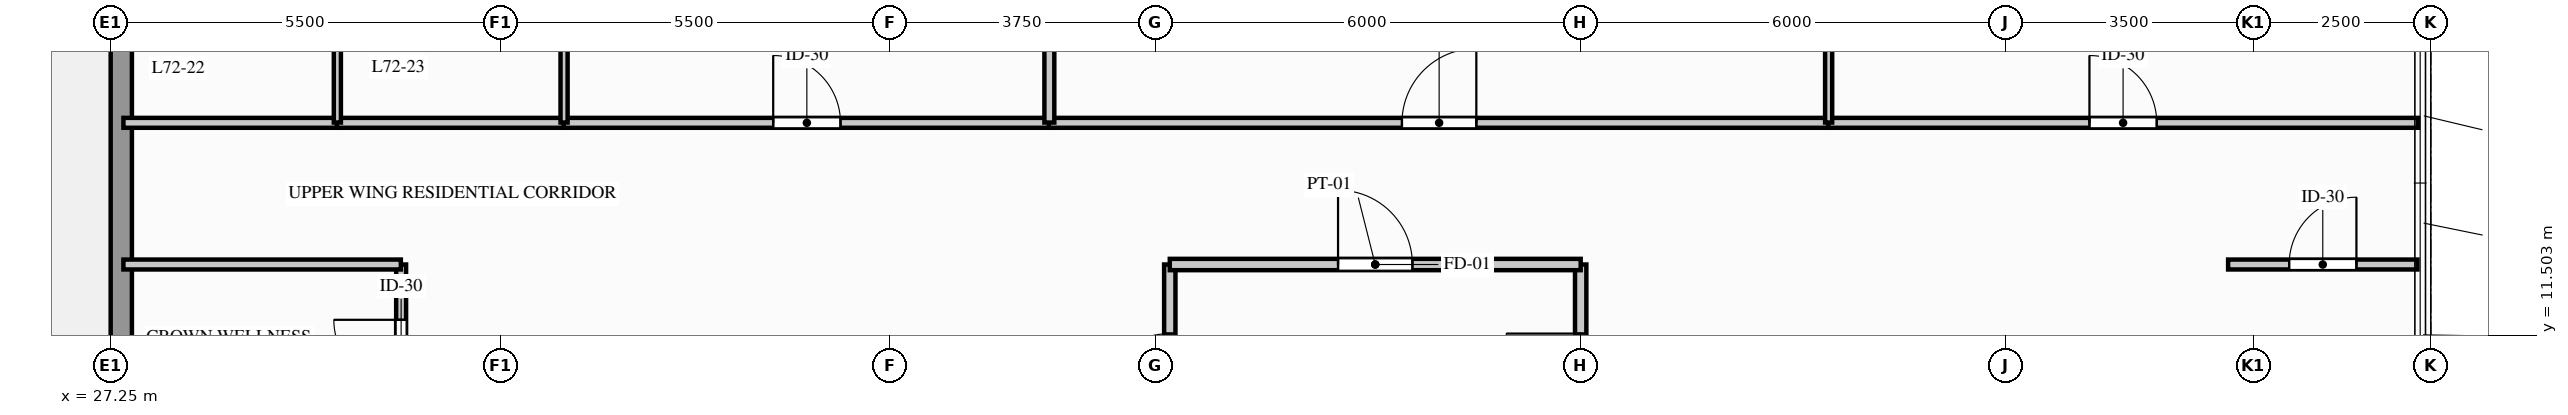
"""IFC4 building model, lengths in metres.
Left out: names, types, materials, properties, quantities, classifications, styles, units other than length and angle.
Written with IfcOpenShell. Run it as: python <this file> out.ifc"""

import sys

from ifc_helpers import new_model, si_unit, direction, frame, frame_2d, origin, place, context, subcontext, project, spatial, rectangle, extrude, element, fill, save


model = new_model("IFC4")
c1 = context("Model", 3, precision=1e-05, world=origin(), true_north=direction((0.0, 1.0)))
c2 = subcontext(c1, "Body", "Model", "MODEL_VIEW")
j1 = project(units=[si_unit("LENGTHUNIT", "METRE"), si_unit("PLANEANGLEUNIT", "RADIAN")], contexts=[c1])
p1 = place(None, origin())
s1 = spatial("IfcSite", under=j1, at=p1, CompositionType="ELEMENT")
p2 = place(p1, origin())
s2 = spatial("IfcBuilding", under=s1, at=p2, CompositionType="ELEMENT")
p3 = place(p2, frame((0.0, 0.0, 236.6)))
s3 = spatial("IfcBuildingStorey", under=s2, at=p3, CompositionType="ELEMENT", Elevation=236.6)
p4 = place(p3, frame((27.4, 24.0, 0.0), z_axis=(0.0, 0.0, 1.0), x_axis=(0.0, -1.0, 0.0)))
e1 = element("IfcWall", 1, at=p4, inside=s3, PredefinedType="STANDARD", context=c2, shape_type="SweptSolid", body=[
    extrude(rectangle(XDim=21.5, YDim=0.3, at=frame_2d((10.75, 0.0))), origin(), (0.0, 0.0, 1.0), 2.635),
])
p5 = place(p4, frame((5.5, 0.0, 0.0)))
e2 = element("IfcOpeningElement", 2, at=p5, cuts=e1, PredefinedType="OPENING", context=c2, shape_type="SweptSolid", body=[
    extrude(rectangle(XDim=1.1, YDim=2.2, at=frame_2d((0.55, 1.1))), frame((0.0, 0.16, 0.0), z_axis=(0.0, -1.0, 0.0), x_axis=(1.0, 0.0, 0.0)), (0.0, 0.0, 1.0), 0.32),
])
p6 = place(p4, frame((2.43, 0.0, 0.616)))
e3 = element("IfcOpeningElement", 3, at=p6, cuts=e1, PredefinedType="OPENING", context=c2, shape_type="SweptSolid", body=[
    extrude(rectangle(XDim=1.5, YDim=1.8, at=frame_2d((0.75, 0.9))), frame((0.0, 0.16, 0.0), z_axis=(0.0, -1.0, 0.0), x_axis=(1.0, 0.0, 0.0)), (0.0, 0.0, 1.0), 0.32),
])
p7 = place(p3, frame((31.35, 9.989, 0.0), z_axis=(0.0, 0.0, 1.0), x_axis=(0.0, 1.0, 0.0)))
e4 = element("IfcWall", 4, at=p7, inside=s3, PredefinedType="PARTITIONING", context=c2, shape_type="SweptSolid", body=[
    extrude(rectangle(XDim=2.511, YDim=0.14, at=frame_2d((1.256, 0.0))), origin(), (0.0, 0.0, 1.0), 2.139),
])
p8 = place(p7, frame((0.781, 0.0, 0.0)))
e5 = element("IfcOpeningElement", 5, at=p8, cuts=e4, PredefinedType="OPENING", context=c2, shape_type="SweptSolid", body=[
    extrude(rectangle(XDim=0.95, YDim=2.05, at=frame_2d((0.475, 1.025))), frame((0.0, 0.08, 0.0), z_axis=(0.0, -1.0, 0.0), x_axis=(1.0, 0.0, 0.0)), (0.0, 0.0, 1.0), 0.16),
])
p9 = place(p3, frame((42.2, 9.5, 0.0), z_axis=(0.0, 0.0, 1.0), x_axis=(0.0, 1.0, 0.0)))
e6 = element("IfcWall", 6, at=p9, inside=s3, PredefinedType="PARTITIONING", context=c2, shape_type="SweptSolid", body=[
    extrude(rectangle(XDim=3.0, YDim=0.16, at=frame_2d((1.5, 0.0))), origin(), (0.0, 0.0, 1.0), 2.139),
])
p10 = place(p9, frame((0.975, 0.0, 0.0)))
e7 = element("IfcOpeningElement", 7, at=p10, cuts=e6, PredefinedType="OPENING", context=c2, shape_type="SweptSolid", body=[
    extrude(rectangle(XDim=1.05, YDim=2.06, at=frame_2d((0.525, 1.03))), frame((0.0, 0.09, 0.0), z_axis=(0.0, -1.0, 0.0), x_axis=(1.0, 0.0, 0.0)), (0.0, 0.0, 1.0), 0.18),
])
p11 = place(p3, frame((48.0, 9.5, 0.0), z_axis=(0.0, 0.0, 1.0), x_axis=(0.0, 1.0, 0.0)))
e8 = element("IfcWall", 8, at=p11, inside=s3, PredefinedType="PARTITIONING", context=c2, shape_type="SweptSolid", body=[
    extrude(rectangle(XDim=3.0, YDim=0.16, at=frame_2d((1.5, 0.0))), origin(), (0.0, 0.0, 1.0), 2.563),
])
p12 = place(p11, frame((0.975, 0.0, 0.0)))
e9 = element("IfcOpeningElement", 9, at=p12, cuts=e8, PredefinedType="OPENING", context=c2, shape_type="SweptSolid", body=[
    extrude(rectangle(XDim=1.05, YDim=2.06, at=frame_2d((0.525, 1.03))), frame((0.0, 0.09, 0.0), z_axis=(0.0, -1.0, 0.0), x_axis=(1.0, 0.0, 0.0)), (0.0, 0.0, 1.0), 0.18),
])
p13 = place(p3, frame((42.2, 12.5, 0.0), z_axis=(0.0, 0.0, 1.0), x_axis=(1.0, 0.0, 0.0)))
e10 = element("IfcWall", 10, at=p13, inside=s3, PredefinedType="PARTITIONING", context=c2, shape_type="SweptSolid", body=[
    extrude(rectangle(XDim=5.8, YDim=0.16, at=frame_2d((2.9, 0.0))), origin(), (0.0, 0.0, 1.0), 2.563),
])
p14 = place(p13, frame((2.375, 0.0, 0.0)))
e11 = element("IfcOpeningElement", 11, at=p14, cuts=e10, PredefinedType="OPENING", context=c2, shape_type="SweptSolid", body=[
    extrude(rectangle(XDim=1.05, YDim=2.06, at=frame_2d((0.525, 1.03))), frame((0.0, 0.09, 0.0), z_axis=(0.0, -1.0, 0.0), x_axis=(1.0, 0.0, 0.0)), (0.0, 0.0, 1.0), 0.18),
])
p15 = place(p3, frame((57.139, 12.5, 0.0), z_axis=(0.0, 0.0, 1.0), x_axis=(1.0, 0.0, 0.0)))
e12 = element("IfcWall", 12, at=p15, inside=s3, PredefinedType="PARTITIONING", context=c2, shape_type="SweptSolid", body=[
    extrude(rectangle(XDim=2.673, YDim=0.14, at=frame_2d((1.336, 0.0))), origin(), (0.0, 0.0, 1.0), 3.2),
])
p16 = place(p15, frame((0.861, 0.0, 0.0)))
e13 = element("IfcOpeningElement", 13, at=p16, cuts=e12, PredefinedType="OPENING", context=c2, shape_type="SweptSolid", body=[
    extrude(rectangle(XDim=0.95, YDim=2.05, at=frame_2d((0.475, 1.025))), frame((0.0, 0.08, 0.0), z_axis=(0.0, -1.0, 0.0), x_axis=(1.0, 0.0, 0.0)), (0.0, 0.0, 1.0), 0.16),
])
p17 = place(p3, frame((27.43, 12.5, 0.0), z_axis=(0.0, 0.0, 1.0), x_axis=(1.0, 0.0, 0.0)))
e14 = element("IfcWall", 14, at=p17, inside=s3, PredefinedType="PARTITIONING", context=c2, shape_type="SweptSolid", body=[
    extrude(rectangle(XDim=3.916, YDim=0.14, at=frame_2d((1.958, 0.0))), origin(), (0.0, 0.0, 1.0), 3.2),
])
p18 = place(p3, frame((27.43, 14.5, 0.0), z_axis=(0.0, 0.0, 1.0), x_axis=(1.0, 0.0, 0.0)))
e15 = element("IfcWall", 15, at=p18, inside=s3, PredefinedType="PARTITIONING", context=c2, shape_type="SweptSolid", body=[
    extrude(rectangle(XDim=3.031, YDim=0.14, at=frame_2d((1.516, 0.0))), origin(), (0.0, 0.0, 1.0), 3.2),
])
p19 = place(p3, frame((30.443, 14.5, 0.0), z_axis=(0.0, 0.0, 1.0), x_axis=(1.0, 0.0, 0.0)))
e16 = element("IfcWall", 16, at=p19, inside=s3, PredefinedType="PARTITIONING", context=c2, shape_type="SweptSolid", body=[
    extrude(rectangle(XDim=3.219, YDim=0.14, at=frame_2d((1.609, 0.0))), origin(), (0.0, 0.0, 1.0), 3.2),
])
p20 = place(p3, frame((33.643, 14.5, 0.0), z_axis=(0.0, 0.0, 1.0), x_axis=(1.0, 0.0, 0.0)))
e17 = element("IfcWall", 17, at=p20, inside=s3, PredefinedType="PARTITIONING", context=c2, shape_type="SweptSolid", body=[
    extrude(rectangle(XDim=6.869, YDim=0.14, at=frame_2d((3.434, 0.0))), origin(), (0.0, 0.0, 1.0), 2.563),
])
p21 = place(p20, frame((2.959, 0.0, 0.0)))
e18 = element("IfcOpeningElement", 18, at=p21, cuts=e17, PredefinedType="OPENING", context=c2, shape_type="SweptSolid", body=[
    extrude(rectangle(XDim=0.95, YDim=2.05, at=frame_2d((0.475, 1.025))), frame((0.0, 0.08, 0.0), z_axis=(0.0, -1.0, 0.0), x_axis=(1.0, 0.0, 0.0)), (0.0, 0.0, 1.0), 0.16),
])
p22 = place(p3, frame((40.493, 14.5, 0.0), z_axis=(0.0, 0.0, 1.0), x_axis=(1.0, 0.0, 0.0)))
e19 = element("IfcWall", 19, at=p22, inside=s3, PredefinedType="PARTITIONING", context=c2, shape_type="SweptSolid", body=[
    extrude(rectangle(XDim=11.019, YDim=0.14, at=frame_2d((5.509, 0.0))), origin(), (0.0, 0.0, 1.0), 2.563),
])
p23 = place(p22, frame((4.984, 0.0, 0.0)))
e20 = element("IfcOpeningElement", 20, at=p23, cuts=e19, PredefinedType="OPENING", context=c2, shape_type="SweptSolid", body=[
    extrude(rectangle(XDim=1.05, YDim=2.06, at=frame_2d((0.525, 1.03))), frame((0.0, 0.08, 0.0), z_axis=(0.0, -1.0, 0.0), x_axis=(1.0, 0.0, 0.0)), (0.0, 0.0, 1.0), 0.16),
])
p24 = place(p3, frame((51.493, 14.5, 0.0), z_axis=(0.0, 0.0, 1.0), x_axis=(1.0, 0.0, 0.0)))
e21 = element("IfcWall", 21, at=p24, inside=s3, PredefinedType="PARTITIONING", context=c2, shape_type="SweptSolid", body=[
    extrude(rectangle(XDim=8.327, YDim=0.14, at=frame_2d((4.164, 0.0))), origin(), (0.0, 0.0, 1.0), 2.563),
])
p25 = place(p24, frame((3.689, 0.0, 0.0)))
e22 = element("IfcOpeningElement", 22, at=p25, cuts=e21, PredefinedType="OPENING", context=c2, shape_type="SweptSolid", body=[
    extrude(rectangle(XDim=0.95, YDim=2.05, at=frame_2d((0.475, 1.025))), frame((0.0, 0.08, 0.0), z_axis=(0.0, -1.0, 0.0), x_axis=(1.0, 0.0, 0.0)), (0.0, 0.0, 1.0), 0.16),
])
for number, where, z_axis, x_axis in (
    (23, (30.45, 14.504, 0.0), (0.0, 0.0, 1.0), (0.0, 1.0, 0.0)),
    (24, (33.65, 14.504, 0.0), (0.0, 0.0, 1.0), (0.0, 1.0, 0.0)),
):
    element("IfcWall", number, at=place(p3, frame(where, z_axis=z_axis, x_axis=x_axis)), inside=s3, PredefinedType="PARTITIONING", context=c2, shape_type="SweptSolid", body=[
        extrude(rectangle(XDim=2.346, YDim=0.1, at=frame_2d((1.173, 0.0))), origin(), (0.0, 0.0, 1.0), 2.139),
    ])
p26 = place(p3, frame((40.5, 14.504, 0.0), z_axis=(0.0, 0.0, 1.0), x_axis=(0.0, 1.0, 0.0)))
e25 = element("IfcWall", 25, at=p26, inside=s3, PredefinedType="PARTITIONING", context=c2, shape_type="SweptSolid", body=[
    extrude(rectangle(XDim=2.342, YDim=0.14, at=frame_2d((1.171, 0.0))), origin(), (0.0, 0.0, 1.0), 2.139),
])
p27 = place(p3, frame((51.5, 14.504, 0.0), z_axis=(0.0, 0.0, 1.0), x_axis=(0.0, 1.0, 0.0)))
e26 = element("IfcWall", 26, at=p27, inside=s3, PredefinedType="PARTITIONING", context=c2, shape_type="SweptSolid", body=[
    extrude(rectangle(XDim=11.816, YDim=0.1, at=frame_2d((5.908, 0.0))), origin(), (0.0, 0.0, 1.0), 2.563),
])
p28 = place(p8, origin())
e27 = element("IfcDoor", 27, at=p28, inside=s3, OperationType="SINGLE_SWING_RIGHT", PredefinedType="DOOR", context=c2, shape_type="SweptSolid", body=[
    extrude(rectangle(XDim=0.95, YDim=2.05, at=frame_2d((0.475, 1.025))), frame((0.0, 0.025, 0.0), z_axis=(0.0, -1.0, 0.0), x_axis=(1.0, 0.0, 0.0)), (0.0, 0.0, 1.0), 0.05),
])
fill(e5, e27)
p29 = place(p10, origin())
e28 = element("IfcDoor", 28, at=p29, inside=s3, OperationType="SINGLE_SWING_LEFT", PredefinedType="DOOR", context=c2, shape_type="SweptSolid", body=[
    extrude(rectangle(XDim=1.05, YDim=2.06, at=frame_2d((0.525, 1.03))), frame((0.0, 0.025, 0.0), z_axis=(0.0, -1.0, 0.0), x_axis=(1.0, 0.0, 0.0)), (0.0, 0.0, 1.0), 0.05),
])
fill(e7, e28)
p30 = place(p12, origin())
e29 = element("IfcDoor", 29, at=p30, inside=s3, OperationType="SINGLE_SWING_RIGHT", PredefinedType="DOOR", context=c2, shape_type="SweptSolid", body=[
    extrude(rectangle(XDim=1.05, YDim=2.06, at=frame_2d((0.525, 1.03))), frame((0.0, 0.025, 0.0), z_axis=(0.0, -1.0, 0.0), x_axis=(1.0, 0.0, 0.0)), (0.0, 0.0, 1.0), 0.05),
])
fill(e9, e29)
p31 = place(p14, origin())
e30 = element("IfcDoor", 30, at=p31, inside=s3, OperationType="SINGLE_SWING_LEFT", PredefinedType="DOOR", context=c2, shape_type="SweptSolid", body=[
    extrude(rectangle(XDim=1.05, YDim=2.06, at=frame_2d((0.525, 1.03))), frame((0.0, 0.025, 0.0), z_axis=(0.0, -1.0, 0.0), x_axis=(1.0, 0.0, 0.0)), (0.0, 0.0, 1.0), 0.05),
])
fill(e11, e30)
p32 = place(p16, origin())
e31 = element("IfcDoor", 31, at=p32, inside=s3, OperationType="SINGLE_SWING_RIGHT", PredefinedType="DOOR", context=c2, shape_type="SweptSolid", body=[
    extrude(rectangle(XDim=0.95, YDim=2.05, at=frame_2d((0.475, 1.025))), frame((0.0, 0.025, 0.0), z_axis=(0.0, -1.0, 0.0), x_axis=(1.0, 0.0, 0.0)), (0.0, 0.0, 1.0), 0.05),
])
fill(e13, e31)
p33 = place(p21, origin())
e32 = element("IfcDoor", 32, at=p33, inside=s3, OperationType="SINGLE_SWING_LEFT", PredefinedType="DOOR", context=c2, shape_type="SweptSolid", body=[
    extrude(rectangle(XDim=0.95, YDim=2.05, at=frame_2d((0.475, 1.025))), frame((0.0, 0.025, 0.0), z_axis=(0.0, -1.0, 0.0), x_axis=(1.0, 0.0, 0.0)), (0.0, 0.0, 1.0), 0.05),
])
fill(e18, e32)
p34 = place(p23, origin())
e33 = element("IfcDoor", 33, at=p34, inside=s3, OperationType="SINGLE_SWING_RIGHT", PredefinedType="DOOR", context=c2, shape_type="SweptSolid", body=[
    extrude(rectangle(XDim=1.05, YDim=2.06, at=frame_2d((0.525, 1.03))), frame((0.0, 0.025, 0.0), z_axis=(0.0, -1.0, 0.0), x_axis=(1.0, 0.0, 0.0)), (0.0, 0.0, 1.0), 0.05),
])
fill(e20, e33)
p35 = place(p25, origin())
e34 = element("IfcDoor", 34, at=p35, inside=s3, OperationType="SINGLE_SWING_LEFT", PredefinedType="DOOR", context=c2, shape_type="SweptSolid", body=[
    extrude(rectangle(XDim=0.95, YDim=2.05, at=frame_2d((0.475, 1.025))), frame((0.0, 0.025, 0.0), z_axis=(0.0, -1.0, 0.0), x_axis=(1.0, 0.0, 0.0)), (0.0, 0.0, 1.0), 0.05),
])
fill(e22, e34)
save(model, sys.argv[1])
